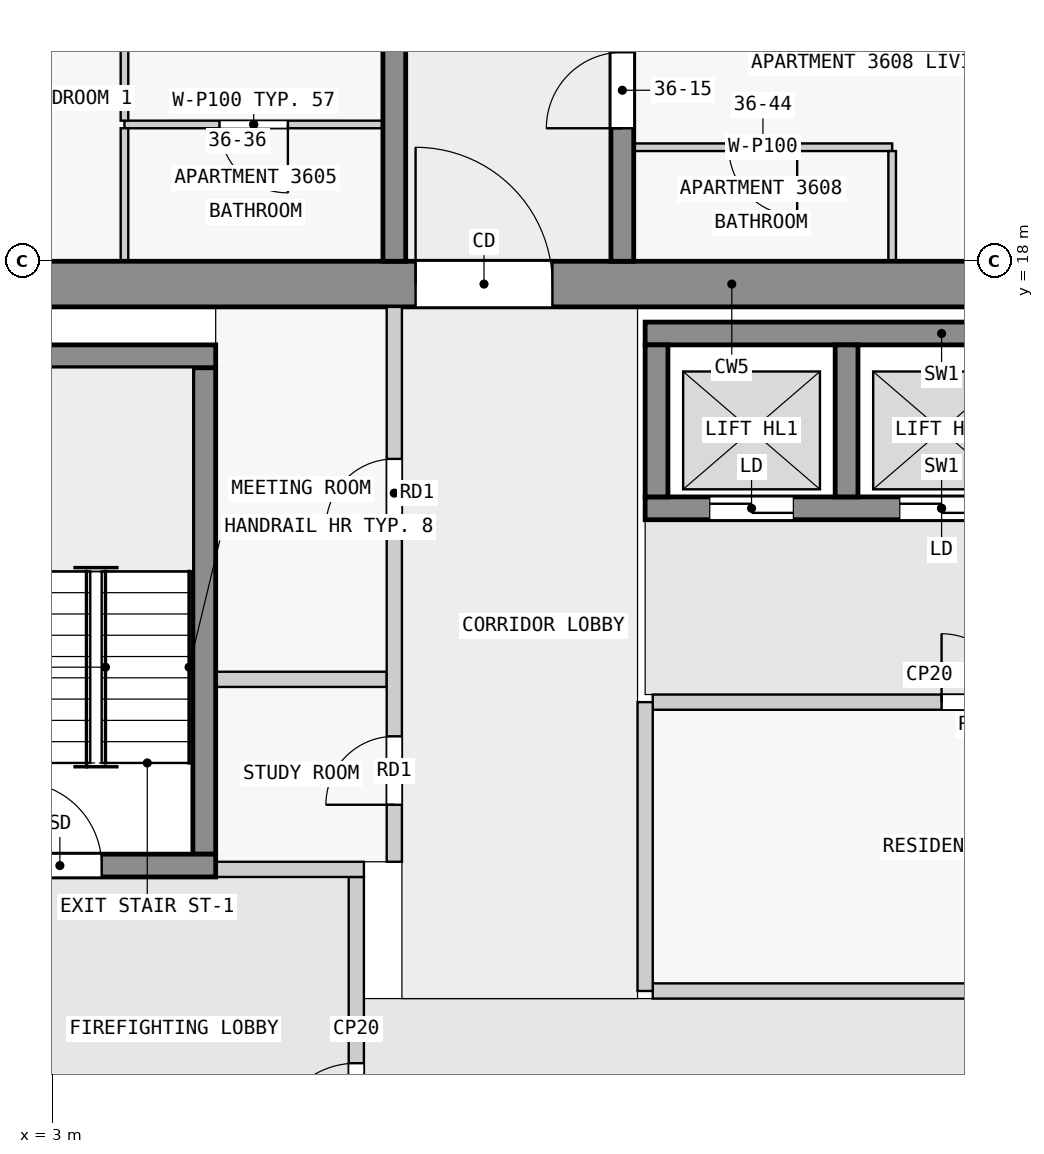
"""IFC4 building model, lengths in metres.
Left out: names, types, materials, properties, quantities, classifications, styles, units other than length and angle.
Written with IfcOpenShell. Run it as: python <this file> out.ifc"""

import sys

from ifc_helpers import new_model, si_unit, direction, frame, frame_2d, origin, place, context, subcontext, project, spatial, rectangle, extrude, element, fill, save


model = new_model("IFC4")
c1 = context("Model", 3, precision=1e-05, world=origin(), true_north=direction((0.0, 1.0)))
c2 = subcontext(c1, "Body", "Model", "MODEL_VIEW")
j1 = project(units=[si_unit("LENGTHUNIT", "METRE"), si_unit("PLANEANGLEUNIT", "RADIAN")], contexts=[c1])
p1 = place(None, origin())
s1 = spatial("IfcSite", under=j1, at=p1, CompositionType="ELEMENT")
p2 = place(p1, origin())
s2 = spatial("IfcBuilding", under=s1, at=p2, CompositionType="ELEMENT")
p3 = place(p2, frame((0.0, 0.0, 142.9)))
s3 = spatial("IfcBuildingStorey", under=s2, at=p3, CompositionType="ELEMENT", Elevation=142.9)
p4 = place(p3, frame((1.38, 17.7, 0.0), z_axis=(0.0, 0.0, 1.0), x_axis=(1.0, 0.0, 0.0)))
e1 = element("IfcWall", 1, at=p4, inside=s3, PredefinedType="SHEAR", context=c2, shape_type="SweptSolid", body=[
    extrude(rectangle(XDim=21.12, YDim=0.6, at=frame_2d((10.56, 0.0))), origin(), (0.0, 0.0, 1.0), 3.25),
])
p5 = place(p4, frame((6.4, 0.0, 0.0)))
e2 = element("IfcOpeningElement", 2, at=p5, cuts=e1, PredefinedType="OPENING", context=c2, shape_type="SweptSolid", body=[
    extrude(rectangle(XDim=1.8, YDim=2.1, at=frame_2d((0.9, 1.05))), frame((0.0, 0.31, 0.0), z_axis=(0.0, -1.0, 0.0), x_axis=(1.0, 0.0, 0.0)), (0.0, 0.0, 1.0), 0.62),
])
p6 = place(p3, frame((2.3, 10.05, 0.0), z_axis=(0.0, 0.0, 1.0), x_axis=(1.0, 0.0, 0.0)))
e3 = element("IfcWall", 3, at=p6, inside=s3, PredefinedType="SHEAR", context=c2, shape_type="SweptSolid", body=[
    extrude(rectangle(XDim=2.85, YDim=0.3, at=frame_2d((1.425, 0.0))), origin(), (0.0, 0.0, 1.0), 3.25),
])
p7 = place(p6, frame((0.25, 0.0, 0.0)))
e4 = element("IfcOpeningElement", 4, at=p7, cuts=e3, PredefinedType="OPENING", context=c2, shape_type="SweptSolid", body=[
    extrude(rectangle(XDim=1.1, YDim=2.1, at=frame_2d((0.55, 1.05))), frame((0.0, 0.16, 0.0), z_axis=(0.0, -1.0, 0.0), x_axis=(1.0, 0.0, 0.0)), (0.0, 0.0, 1.0), 0.32),
])
p8 = place(p3, frame((5.0, 10.2, 0.0), z_axis=(0.0, 0.0, 1.0), x_axis=(0.0, 1.0, 0.0)))
e5 = element("IfcWall", 5, at=p8, inside=s3, PredefinedType="SHEAR", context=c2, shape_type="SweptSolid", body=[
    extrude(rectangle(XDim=6.4, YDim=0.3, at=frame_2d((3.2, 0.0))), origin(), (0.0, 0.0, 1.0), 3.25),
])
p9 = place(p3, frame((2.3, 16.75, 0.0), z_axis=(0.0, 0.0, 1.0), x_axis=(1.0, 0.0, 0.0)))
e6 = element("IfcWall", 6, at=p9, inside=s3, PredefinedType="SHEAR", context=c2, shape_type="SweptSolid", body=[
    extrude(rectangle(XDim=2.85, YDim=0.3, at=frame_2d((1.425, 0.0))), origin(), (0.0, 0.0, 1.0), 3.25),
])
p10 = place(p3, frame((10.8, 17.05, 0.0), z_axis=(0.0, 0.0, 1.0), x_axis=(1.0, 0.0, 0.0)))
e7 = element("IfcWall", 7, at=p10, inside=s3, PredefinedType="SHEAR", context=c2, shape_type="SweptSolid", body=[
    extrude(rectangle(XDim=7.8, YDim=0.3, at=frame_2d((3.9, 0.0))), origin(), (0.0, 0.0, 1.0), 3.25),
])
p11 = place(p3, frame((10.8, 14.75, 0.0), z_axis=(0.0, 0.0, 1.0), x_axis=(1.0, 0.0, 0.0)))
e8 = element("IfcWall", 8, at=p11, inside=s3, PredefinedType="SHEAR", context=c2, shape_type="SweptSolid", body=[
    extrude(rectangle(XDim=7.8, YDim=0.3, at=frame_2d((3.9, 0.0))), origin(), (0.0, 0.0, 1.0), 3.25),
])
p12 = place(p11, frame((0.85, 0.0, 0.0)))
e9 = element("IfcOpeningElement", 9, at=p12, cuts=e8, PredefinedType="OPENING", context=c2, shape_type="SweptSolid", body=[
    extrude(rectangle(XDim=1.1, YDim=2.1, at=frame_2d((0.55, 1.05))), frame((0.0, 0.16, 0.0), z_axis=(0.0, -1.0, 0.0), x_axis=(1.0, 0.0, 0.0)), (0.0, 0.0, 1.0), 0.32),
])
p13 = place(p11, frame((3.35, 0.0, 0.0)))
e10 = element("IfcOpeningElement", 10, at=p13, cuts=e8, PredefinedType="OPENING", context=c2, shape_type="SweptSolid", body=[
    extrude(rectangle(XDim=1.1, YDim=2.1, at=frame_2d((0.55, 1.05))), frame((0.0, 0.16, 0.0), z_axis=(0.0, -1.0, 0.0), x_axis=(1.0, 0.0, 0.0)), (0.0, 0.0, 1.0), 0.32),
])
p14 = place(p11, frame((5.85, 0.0, 0.0)))
e11 = element("IfcOpeningElement", 11, at=p14, cuts=e8, PredefinedType="OPENING", context=c2, shape_type="SweptSolid", body=[
    extrude(rectangle(XDim=1.1, YDim=2.1, at=frame_2d((0.55, 1.05))), frame((0.0, 0.16, 0.0), z_axis=(0.0, -1.0, 0.0), x_axis=(1.0, 0.0, 0.0)), (0.0, 0.0, 1.0), 0.32),
])
for number, where, z_axis, x_axis in (
    (12, (10.95, 14.9, 0.0), (0.0, 0.0, 1.0), (0.0, 1.0, 0.0)),
    (13, (13.45, 14.9, 0.0), (0.0, 0.0, 1.0), (0.0, 1.0, 0.0)),
):
    element("IfcWall", number, at=place(p3, frame(where, z_axis=z_axis, x_axis=x_axis)), inside=s3, PredefinedType="SHEAR", context=c2, shape_type="SweptSolid", body=[
        extrude(rectangle(XDim=2.0, YDim=0.3, at=frame_2d((1.0, 0.0))), origin(), (0.0, 0.0, 1.0), 3.25),
    ])
p15 = place(p3, frame((7.5, 18.0, 0.0), z_axis=(0.0, 0.0, 1.0), x_axis=(0.0, 1.0, 0.0)))
e14 = element("IfcWall", 14, at=p15, inside=s3, PredefinedType="SHEAR", context=c2, shape_type="SweptSolid", body=[
    extrude(rectangle(XDim=27.0, YDim=0.3, at=frame_2d((13.5, 0.0))), origin(), (0.0, 0.0, 1.0), 3.25),
])
p16 = place(p15, frame((4.05, 0.0, 0.0)))
e15 = element("IfcOpeningElement", 15, at=p16, cuts=e14, PredefinedType="OPENING", context=c2, shape_type="SweptSolid", body=[
    extrude(rectangle(XDim=1.0, YDim=2.1, at=frame_2d((0.5, 1.05))), frame((0.0, 0.16, 0.0), z_axis=(0.0, -1.0, 0.0), x_axis=(1.0, 0.0, 0.0)), (0.0, 0.0, 1.0), 0.32),
])
p17 = place(p15, frame((10.75, 0.0, 0.0)))
e16 = element("IfcOpeningElement", 16, at=p17, cuts=e14, PredefinedType="OPENING", context=c2, shape_type="SweptSolid", body=[
    extrude(rectangle(XDim=1.0, YDim=2.1, at=frame_2d((0.5, 1.05))), frame((0.0, 0.16, 0.0), z_axis=(0.0, -1.0, 0.0), x_axis=(1.0, 0.0, 0.0)), (0.0, 0.0, 1.0), 0.32),
])
p18 = place(p15, frame((17.55, 0.0, 0.0)))
e17 = element("IfcOpeningElement", 17, at=p18, cuts=e14, PredefinedType="OPENING", context=c2, shape_type="SweptSolid", body=[
    extrude(rectangle(XDim=1.0, YDim=2.1, at=frame_2d((0.5, 1.05))), frame((0.0, 0.16, 0.0), z_axis=(0.0, -1.0, 0.0), x_axis=(1.0, 0.0, 0.0)), (0.0, 0.0, 1.0), 0.32),
])
p19 = place(p15, frame((23.25, 0.0, 0.0)))
e18 = element("IfcOpeningElement", 18, at=p19, cuts=e14, PredefinedType="OPENING", context=c2, shape_type="SweptSolid", body=[
    extrude(rectangle(XDim=0.9, YDim=2.1, at=frame_2d((0.45, 1.05))), frame((0.0, 0.16, 0.0), z_axis=(0.0, -1.0, 0.0), x_axis=(1.0, 0.0, 0.0)), (0.0, 0.0, 1.0), 0.32),
])
p20 = place(p15, frame((25.45, 0.0, 0.0)))
e19 = element("IfcOpeningElement", 19, at=p20, cuts=e14, PredefinedType="OPENING", context=c2, shape_type="SweptSolid", body=[
    extrude(rectangle(XDim=1.0, YDim=2.1, at=frame_2d((0.5, 1.05))), frame((0.0, 0.16, 0.0), z_axis=(0.0, -1.0, 0.0), x_axis=(1.0, 0.0, 0.0)), (0.0, 0.0, 1.0), 0.32),
])
p21 = place(p3, frame((10.5, 18.0, 0.0), z_axis=(0.0, 0.0, 1.0), x_axis=(0.0, 1.0, 0.0)))
e20 = element("IfcWall", 20, at=p21, inside=s3, PredefinedType="SHEAR", context=c2, shape_type="SweptSolid", body=[
    extrude(rectangle(XDim=27.0, YDim=0.3, at=frame_2d((13.5, 0.0))), origin(), (0.0, 0.0, 1.0), 3.25),
])
p22 = place(p21, frame((1.75, 0.0, 0.0)))
e21 = element("IfcOpeningElement", 21, at=p22, cuts=e20, PredefinedType="OPENING", context=c2, shape_type="SweptSolid", body=[
    extrude(rectangle(XDim=1.0, YDim=2.1, at=frame_2d((0.5, 1.05))), frame((0.0, 0.16, 0.0), z_axis=(0.0, -1.0, 0.0), x_axis=(1.0, 0.0, 0.0)), (0.0, 0.0, 1.0), 0.32),
])
p23 = place(p21, frame((6.25, 0.0, 0.0)))
e22 = element("IfcOpeningElement", 22, at=p23, cuts=e20, PredefinedType="OPENING", context=c2, shape_type="SweptSolid", body=[
    extrude(rectangle(XDim=1.0, YDim=2.1, at=frame_2d((0.5, 1.05))), frame((0.0, 0.16, 0.0), z_axis=(0.0, -1.0, 0.0), x_axis=(1.0, 0.0, 0.0)), (0.0, 0.0, 1.0), 0.32),
])
p24 = place(p21, frame((10.35, 0.0, 0.0)))
e23 = element("IfcOpeningElement", 23, at=p24, cuts=e20, PredefinedType="OPENING", context=c2, shape_type="SweptSolid", body=[
    extrude(rectangle(XDim=1.8, YDim=2.1, at=frame_2d((0.9, 1.05))), frame((0.0, 0.16, 0.0), z_axis=(0.0, -1.0, 0.0), x_axis=(1.0, 0.0, 0.0)), (0.0, 0.0, 1.0), 0.32),
])
p25 = place(p21, frame((15.25, 0.0, 0.0)))
e24 = element("IfcOpeningElement", 24, at=p25, cuts=e20, PredefinedType="OPENING", context=c2, shape_type="SweptSolid", body=[
    extrude(rectangle(XDim=1.0, YDim=2.1, at=frame_2d((0.5, 1.05))), frame((0.0, 0.16, 0.0), z_axis=(0.0, -1.0, 0.0), x_axis=(1.0, 0.0, 0.0)), (0.0, 0.0, 1.0), 0.32),
])
p26 = place(p21, frame((21.35, 0.0, 0.0)))
e25 = element("IfcOpeningElement", 25, at=p26, cuts=e20, PredefinedType="OPENING", context=c2, shape_type="SweptSolid", body=[
    extrude(rectangle(XDim=1.0, YDim=2.1, at=frame_2d((0.5, 1.05))), frame((0.0, 0.16, 0.0), z_axis=(0.0, -1.0, 0.0), x_axis=(1.0, 0.0, 0.0)), (0.0, 0.0, 1.0), 0.32),
])
p27 = place(p3, frame((7.0, 5.9, 0.0), z_axis=(0.0, 0.0, 1.0), x_axis=(0.0, 1.0, 0.0)))
e26 = element("IfcWall", 26, at=p27, inside=s3, PredefinedType="PARTITIONING", context=c2, shape_type="SweptSolid", body=[
    extrude(rectangle(XDim=4.0, YDim=0.2, at=frame_2d((2.0, 0.0))), origin(), (0.0, 0.0, 1.0), 3.25),
])
p28 = place(p27, frame((0.45, 0.0, 0.0)))
e27 = element("IfcOpeningElement", 27, at=p28, cuts=e26, PredefinedType="OPENING", context=c2, shape_type="SweptSolid", body=[
    extrude(rectangle(XDim=1.1, YDim=2.1, at=frame_2d((0.55, 1.05))), frame((0.0, 0.11, 0.0), z_axis=(0.0, -1.0, 0.0), x_axis=(1.0, 0.0, 0.0)), (0.0, 0.0, 1.0), 0.22),
])
p29 = place(p3, frame((5.15, 10.0, 0.0), z_axis=(0.0, 0.0, 1.0), x_axis=(1.0, 0.0, 0.0)))
e28 = element("IfcWall", 28, at=p29, inside=s3, PredefinedType="PARTITIONING", context=c2, shape_type="SweptSolid", body=[
    extrude(rectangle(XDim=1.95, YDim=0.2, at=frame_2d((0.975, 0.0))), origin(), (0.0, 0.0, 1.0), 3.25),
])
p30 = place(p3, frame((10.8, 8.4, 0.0), z_axis=(0.0, 0.0, 1.0), x_axis=(0.0, 1.0, 0.0)))
e29 = element("IfcWall", 29, at=p30, inside=s3, PredefinedType="PARTITIONING", context=c2, shape_type="SweptSolid", body=[
    extrude(rectangle(XDim=3.8, YDim=0.2, at=frame_2d((1.9, 0.0))), origin(), (0.0, 0.0, 1.0), 3.25),
])
p31 = place(p3, frame((10.9, 8.4, 0.0), z_axis=(0.0, 0.0, 1.0), x_axis=(1.0, 0.0, 0.0)))
e30 = element("IfcWall", 30, at=p31, inside=s3, PredefinedType="PARTITIONING", context=c2, shape_type="SweptSolid", body=[
    extrude(rectangle(XDim=8.5, YDim=0.2, at=frame_2d((4.25, 0.0))), origin(), (0.0, 0.0, 1.0), 3.25),
])
p32 = place(p3, frame((10.9, 12.2, 0.0), z_axis=(0.0, 0.0, 1.0), x_axis=(1.0, 0.0, 0.0)))
e31 = element("IfcWall", 31, at=p32, inside=s3, PredefinedType="PARTITIONING", context=c2, shape_type="SweptSolid", body=[
    extrude(rectangle(XDim=8.5, YDim=0.2, at=frame_2d((4.25, 0.0))), origin(), (0.0, 0.0, 1.0), 3.25),
])
p33 = place(p32, frame((3.8, 0.0, 0.0)))
e32 = element("IfcOpeningElement", 32, at=p33, cuts=e31, PredefinedType="OPENING", context=c2, shape_type="SweptSolid", body=[
    extrude(rectangle(XDim=0.9, YDim=2.1, at=frame_2d((0.45, 1.05))), frame((0.0, 0.11, 0.0), z_axis=(0.0, -1.0, 0.0), x_axis=(1.0, 0.0, 0.0)), (0.0, 0.0, 1.0), 0.22),
])
p34 = place(p3, frame((7.5, 10.1, 0.0), z_axis=(0.0, 0.0, 1.0), x_axis=(0.0, 1.0, 0.0)))
e33 = element("IfcWall", 33, at=p34, inside=s3, PredefinedType="PARTITIONING", context=c2, shape_type="SweptSolid", body=[
    extrude(rectangle(XDim=7.3, YDim=0.2, at=frame_2d((3.65, 0.0))), origin(), (0.0, 0.0, 1.0), 3.25),
])
p35 = place(p34, frame((0.75, 0.0, 0.0)))
e34 = element("IfcOpeningElement", 34, at=p35, cuts=e33, PredefinedType="OPENING", context=c2, shape_type="SweptSolid", body=[
    extrude(rectangle(XDim=0.9, YDim=2.1, at=frame_2d((0.45, 1.05))), frame((0.0, 0.11, 0.0), z_axis=(0.0, -1.0, 0.0), x_axis=(1.0, 0.0, 0.0)), (0.0, 0.0, 1.0), 0.22),
])
p36 = place(p34, frame((4.4, 0.0, 0.0)))
e35 = element("IfcOpeningElement", 35, at=p36, cuts=e33, PredefinedType="OPENING", context=c2, shape_type="SweptSolid", body=[
    extrude(rectangle(XDim=0.9, YDim=2.1, at=frame_2d((0.45, 1.05))), frame((0.0, 0.11, 0.0), z_axis=(0.0, -1.0, 0.0), x_axis=(1.0, 0.0, 0.0)), (0.0, 0.0, 1.0), 0.22),
])
p37 = place(p3, frame((5.15, 12.5, 0.0), z_axis=(0.0, 0.0, 1.0), x_axis=(1.0, 0.0, 0.0)))
e36 = element("IfcWall", 36, at=p37, inside=s3, PredefinedType="PARTITIONING", context=c2, shape_type="SweptSolid", body=[
    extrude(rectangle(XDim=2.25, YDim=0.2, at=frame_2d((1.125, 0.0))), origin(), (0.0, 0.0, 1.0), 3.25),
])
p38 = place(p3, frame((14.05, 19.5, 0.0), z_axis=(0.0, 0.0, 1.0), x_axis=(-1.0, 0.0, 0.0)))
e37 = element("IfcWall", 37, at=p38, inside=s3, PredefinedType="PARTITIONING", context=c2, shape_type="SweptSolid", body=[
    extrude(rectangle(XDim=3.4, YDim=0.1, at=frame_2d((1.7, 0.0))), origin(), (0.0, 0.0, 1.0), 3.25),
])
p39 = place(p38, frame((1.25, 0.0, 0.0)))
e38 = element("IfcOpeningElement", 38, at=p39, cuts=e37, PredefinedType="OPENING", context=c2, shape_type="SweptSolid", body=[
    extrude(rectangle(XDim=0.9, YDim=2.1, at=frame_2d((0.45, 1.05))), frame((0.0, 0.06, 0.0), z_axis=(0.0, -1.0, 0.0), x_axis=(1.0, 0.0, 0.0)), (0.0, 0.0, 1.0), 0.12),
])
p40 = place(p3, frame((7.35, 19.8, 0.0), z_axis=(0.0, 0.0, 1.0), x_axis=(-1.0, 0.0, 0.0)))
e39 = element("IfcWall", 39, at=p40, inside=s3, PredefinedType="PARTITIONING", context=c2, shape_type="SweptSolid", body=[
    extrude(rectangle(XDim=3.4, YDim=0.1, at=frame_2d((1.7, 0.0))), origin(), (0.0, 0.0, 1.0), 3.25),
])
p41 = place(p40, frame((1.25, 0.0, 0.0)))
e40 = element("IfcOpeningElement", 40, at=p41, cuts=e39, PredefinedType="OPENING", context=c2, shape_type="SweptSolid", body=[
    extrude(rectangle(XDim=0.9, YDim=2.1, at=frame_2d((0.45, 1.05))), frame((0.0, 0.06, 0.0), z_axis=(0.0, -1.0, 0.0), x_axis=(1.0, 0.0, 0.0)), (0.0, 0.0, 1.0), 0.12),
])
p42 = place(p3, frame((3.95, 19.75, 0.0), z_axis=(0.0, 0.0, 1.0), x_axis=(0.0, -1.0, 0.0)))
e41 = element("IfcWall", 41, at=p42, inside=s3, PredefinedType="PARTITIONING", context=c2, shape_type="SweptSolid", body=[
    extrude(rectangle(XDim=1.75, YDim=0.1, at=frame_2d((0.875, 0.0))), origin(), (0.0, 0.0, 1.0), 3.25),
])
p43 = place(p3, frame((3.95, 19.85, 0.0), z_axis=(0.0, 0.0, 1.0), x_axis=(0.0, 1.0, 0.0)))
e42 = element("IfcWall", 42, at=p43, inside=s3, PredefinedType="PARTITIONING", context=c2, shape_type="SweptSolid", body=[
    extrude(rectangle(XDim=2.6, YDim=0.1, at=frame_2d((1.3, 0.0))), origin(), (0.0, 0.0, 1.0), 3.25),
])
p44 = place(p3, frame((14.05, 18.0, 0.0), z_axis=(0.0, 0.0, 1.0), x_axis=(0.0, 1.0, 0.0)))
e43 = element("IfcWall", 43, at=p44, inside=s3, PredefinedType="PARTITIONING", context=c2, shape_type="SweptSolid", body=[
    extrude(rectangle(XDim=1.45, YDim=0.1, at=frame_2d((0.725, 0.0))), origin(), (0.0, 0.0, 1.0), 3.25),
])
p45 = place(p28, origin())
e44 = element("IfcDoor", 44, at=p45, inside=s3, OperationType="SINGLE_SWING_LEFT", PredefinedType="DOOR", context=c2, shape_type="SweptSolid", body=[
    extrude(rectangle(XDim=1.1, YDim=2.1, at=frame_2d((0.55, 1.05))), frame((0.0, 0.025, 0.0), z_axis=(0.0, -1.0, 0.0), x_axis=(1.0, 0.0, 0.0)), (0.0, 0.0, 1.0), 0.05),
])
fill(e27, e44)
p46 = place(p7, origin())
e45 = element("IfcDoor", 45, at=p46, inside=s3, OperationType="SINGLE_SWING_RIGHT", PredefinedType="DOOR", context=c2, shape_type="SweptSolid", body=[
    extrude(rectangle(XDim=1.1, YDim=2.1, at=frame_2d((0.55, 1.05))), frame((0.0, 0.025, 0.0), z_axis=(0.0, -1.0, 0.0), x_axis=(1.0, 0.0, 0.0)), (0.0, 0.0, 1.0), 0.05),
])
fill(e4, e45)
p47 = place(p33, origin())
e46 = element("IfcDoor", 46, at=p47, inside=s3, OperationType="SINGLE_SWING_LEFT", PredefinedType="DOOR", context=c2, shape_type="SweptSolid", body=[
    extrude(rectangle(XDim=0.9, YDim=2.1, at=frame_2d((0.45, 1.05))), frame((0.0, 0.025, 0.0), z_axis=(0.0, -1.0, 0.0), x_axis=(1.0, 0.0, 0.0)), (0.0, 0.0, 1.0), 0.05),
])
fill(e32, e46)
p48 = place(p12, origin())
e47 = element("IfcDoor", 47, at=p48, inside=s3, OperationType="DOUBLE_DOOR_SLIDING", PredefinedType="DOOR", context=c2, shape_type="SweptSolid", body=[
    extrude(rectangle(XDim=1.1, YDim=2.1, at=frame_2d((0.55, 1.05))), frame((0.0, 0.025, 0.0), z_axis=(0.0, -1.0, 0.0), x_axis=(1.0, 0.0, 0.0)), (0.0, 0.0, 1.0), 0.05),
])
fill(e9, e47)
p49 = place(p13, origin())
e48 = element("IfcDoor", 48, at=p49, inside=s3, OperationType="DOUBLE_DOOR_SLIDING", PredefinedType="DOOR", context=c2, shape_type="SweptSolid", body=[
    extrude(rectangle(XDim=1.1, YDim=2.1, at=frame_2d((0.55, 1.05))), frame((0.0, 0.025, 0.0), z_axis=(0.0, -1.0, 0.0), x_axis=(1.0, 0.0, 0.0)), (0.0, 0.0, 1.0), 0.05),
])
fill(e10, e48)
p50 = place(p5, origin())
e49 = element("IfcDoor", 49, at=p50, inside=s3, OperationType="DOUBLE_DOOR_SINGLE_SWING", PredefinedType="DOOR", context=c2, shape_type="SweptSolid", body=[
    extrude(rectangle(XDim=1.8, YDim=2.1, at=frame_2d((0.9, 1.05))), frame((0.0, 0.025, 0.0), z_axis=(0.0, -1.0, 0.0), x_axis=(1.0, 0.0, 0.0)), (0.0, 0.0, 1.0), 0.05),
])
fill(e2, e49)
p51 = place(p35, origin())
e50 = element("IfcDoor", 50, at=p51, inside=s3, OperationType="SINGLE_SWING_RIGHT", PredefinedType="DOOR", context=c2, shape_type="SweptSolid", body=[
    extrude(rectangle(XDim=0.9, YDim=2.1, at=frame_2d((0.45, 1.05))), frame((0.0, 0.025, 0.0), z_axis=(0.0, -1.0, 0.0), x_axis=(1.0, 0.0, 0.0)), (0.0, 0.0, 1.0), 0.05),
])
fill(e34, e50)
p52 = place(p36, origin())
e51 = element("IfcDoor", 51, at=p52, inside=s3, OperationType="SINGLE_SWING_RIGHT", PredefinedType="DOOR", context=c2, shape_type="SweptSolid", body=[
    extrude(rectangle(XDim=0.9, YDim=2.1, at=frame_2d((0.45, 1.05))), frame((0.0, 0.025, 0.0), z_axis=(0.0, -1.0, 0.0), x_axis=(1.0, 0.0, 0.0)), (0.0, 0.0, 1.0), 0.05),
])
fill(e35, e51)
p53 = place(p22, origin())
e52 = element("IfcDoor", 52, at=p53, inside=s3, OperationType="SINGLE_SWING_LEFT", PredefinedType="DOOR", context=c2, shape_type="SweptSolid", body=[
    extrude(rectangle(XDim=1.0, YDim=2.1, at=frame_2d((0.5, 1.05))), frame((0.0, 0.025, 0.0), z_axis=(0.0, -1.0, 0.0), x_axis=(1.0, 0.0, 0.0)), (0.0, 0.0, 1.0), 0.05),
])
fill(e21, e52)
p54 = place(p41, origin())
e53 = element("IfcDoor", 53, at=p54, inside=s3, OperationType="SINGLE_SWING_RIGHT", PredefinedType="DOOR", context=c2, shape_type="SweptSolid", body=[
    extrude(rectangle(XDim=0.9, YDim=2.1, at=frame_2d((0.45, 1.05))), frame((0.0, 0.025, 0.0), z_axis=(0.0, -1.0, 0.0), x_axis=(1.0, 0.0, 0.0)), (0.0, 0.0, 1.0), 0.05),
])
fill(e40, e53)
p55 = place(p39, origin())
e54 = element("IfcDoor", 54, at=p55, inside=s3, OperationType="SINGLE_SWING_LEFT", PredefinedType="DOOR", context=c2, shape_type="SweptSolid", body=[
    extrude(rectangle(XDim=0.9, YDim=2.1, at=frame_2d((0.45, 1.05))), frame((0.0, 0.025, 0.0), z_axis=(0.0, -1.0, 0.0), x_axis=(1.0, 0.0, 0.0)), (0.0, 0.0, 1.0), 0.05),
])
fill(e38, e54)
save(model, sys.argv[1])
